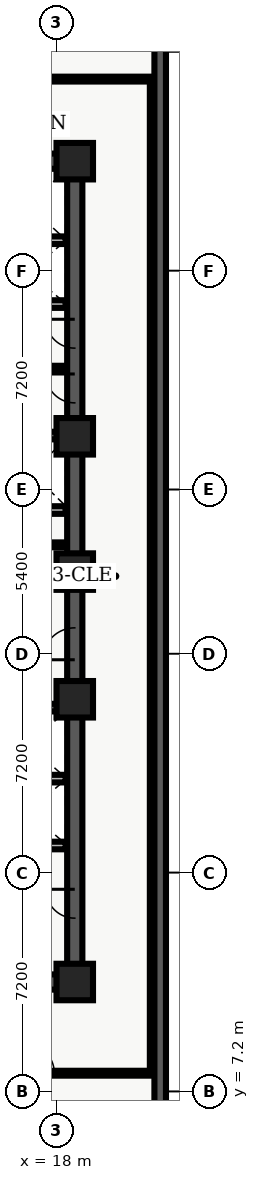
"""IFC4 building model, lengths in metres.
Left out: names, types, materials, properties, quantities, classifications, styles, units other than length and angle.
Written with IfcOpenShell. Run it as: python <this file> out.ifc"""

import sys

from ifc_helpers import new_model, entity, si_unit, converted_unit, direction, frame, origin_with_axes, origin_2d_with_axis, place, context, subcontext, project, spatial, polyline, rectangle, outline, extrude, element, fill, save


model = new_model("IFC4")
c1 = context("Model", 3, precision=1e-05, world=origin_with_axes(), true_north=direction((0.0, 1.0)))
c2 = subcontext(c1, "Body", "Model", "MODEL_VIEW")
j1 = project(units=[si_unit("LENGTHUNIT", "METRE"), converted_unit("PLANEANGLEUNIT", "DEGREE", entity("IfcPlaneAngleMeasure", 0.017), si_unit("PLANEANGLEUNIT", "RADIAN"), dimensions=[0, 0, 0, 0, 0, 0, 0])], contexts=[c1])
p1 = place(None, origin_with_axes())
s1 = spatial("IfcSite", under=j1, at=p1, CompositionType="ELEMENT")
p2 = place(p1, origin_with_axes())
s2 = spatial("IfcBuilding", under=s1, at=p2, CompositionType="ELEMENT")
p3 = place(p2, frame((0.0, 0.0, 96.9), z_axis=(0.0, 0.0, 1.0), x_axis=(1.0, 0.0, 0.0)))
s3 = spatial("IfcBuildingStorey", under=s2, at=p3, CompositionType="ELEMENT", Elevation=96.9)
p4 = place(p3, frame((11.4, 10.8, 0.0), z_axis=(0.0, 0.0, 1.0), x_axis=(1.0, 0.0, 0.0)))
e1 = element("IfcWall", 1, at=p4, inside=s3, PredefinedType="SHEAR", context=c2, shape_type="SweptSolid", body=[
    extrude(outline(polyline([(0.0, -0.25), (7.2, -0.25), (7.2, 0.25), (0.0, 0.25), (0.0, -0.25)])), origin_with_axes(), (0.0, 0.0, 1.0), 3.66),
])
p5 = place(p4, frame((2.625, 0.0, 0.0), z_axis=(0.0, 0.0, 1.0), x_axis=(1.0, 0.0, 0.0)))
e2 = element("IfcOpeningElement", 2, at=p5, cuts=e1, PredefinedType="OPENING", context=c2, shape_type="SweptSolid", body=[
    extrude(rectangle(XDim=1.05, YDim=0.52, at=origin_2d_with_axis()), origin_with_axes(), (0.0, 0.0, 1.0), 2.15),
])
p6 = place(p3, frame((11.4, 37.8, 0.0), z_axis=(0.0, 0.0, 1.0), x_axis=(1.0, 0.0, 0.0)))
e3 = element("IfcWall", 3, at=p6, inside=s3, PredefinedType="SHEAR", context=c2, shape_type="SweptSolid", body=[
    extrude(outline(polyline([(0.0, -0.25), (7.2, -0.25), (7.2, 0.25), (0.0, 0.25), (0.0, -0.25)])), origin_with_axes(), (0.0, 0.0, 1.0), 3.66),
])
p7 = place(p6, frame((2.625, 0.0, 0.0), z_axis=(0.0, 0.0, 1.0), x_axis=(1.0, 0.0, 0.0)))
e4 = element("IfcOpeningElement", 4, at=p7, cuts=e3, PredefinedType="OPENING", context=c2, shape_type="SweptSolid", body=[
    extrude(rectangle(XDim=1.05, YDim=0.52, at=origin_2d_with_axis()), origin_with_axes(), (0.0, 0.0, 1.0), 2.15),
])
p8 = place(p3, frame((18.6, 10.8, 0.0), z_axis=(0.0, 0.0, 1.0), x_axis=(0.0, 1.0, 0.0)))
e5 = element("IfcWall", 5, at=p8, inside=s3, PredefinedType="SHEAR", context=c2, shape_type="SweptSolid", body=[
    extrude(outline(polyline([(0.0, -0.25), (13.5, -0.25), (13.5, 0.25), (0.0, 0.25), (0.0, -0.25)])), origin_with_axes(), (0.0, 0.0, 1.0), 3.66),
])
p9 = place(p8, frame((11.125, 0.0, 0.0), z_axis=(0.0, 0.0, 1.0), x_axis=(1.0, 0.0, 0.0)))
e6 = element("IfcOpeningElement", 6, at=p9, cuts=e5, PredefinedType="OPENING", context=c2, shape_type="SweptSolid", body=[
    extrude(rectangle(XDim=1.05, YDim=0.52, at=origin_2d_with_axis()), origin_with_axes(), (0.0, 0.0, 1.0), 2.15),
])
p10 = place(p8, frame((2.575, 0.0, 0.0), z_axis=(0.0, 0.0, 1.0), x_axis=(1.0, 0.0, 0.0)))
e7 = element("IfcOpeningElement", 7, at=p10, cuts=e5, PredefinedType="OPENING", context=c2, shape_type="SweptSolid", body=[
    extrude(rectangle(XDim=0.95, YDim=0.52, at=origin_2d_with_axis()), origin_with_axes(), (0.0, 0.0, 1.0), 2.15),
])
p11 = place(p3, frame((18.6, 24.3, 0.0), z_axis=(0.0, 0.0, 1.0), x_axis=(0.0, 1.0, 0.0)))
e8 = element("IfcWall", 8, at=p11, inside=s3, PredefinedType="SHEAR", context=c2, shape_type="SweptSolid", body=[
    extrude(outline(polyline([(0.0, -0.25), (13.5, -0.25), (13.5, 0.25), (0.0, 0.25), (0.0, -0.25)])), origin_with_axes(), (0.0, 0.0, 1.0), 3.66),
])
p12 = place(p11, frame((6.025, 0.0, 0.0), z_axis=(0.0, 0.0, 1.0), x_axis=(1.0, 0.0, 0.0)))
e9 = element("IfcOpeningElement", 9, at=p12, cuts=e8, PredefinedType="OPENING", context=c2, shape_type="SweptSolid", body=[
    extrude(rectangle(XDim=0.95, YDim=0.52, at=origin_2d_with_axis()), origin_with_axes(), (0.0, 0.0, 1.0), 2.15),
])
p13 = place(p11, frame((7.825, 0.0, 0.0), z_axis=(0.0, 0.0, 1.0), x_axis=(1.0, 0.0, 0.0)))
e10 = element("IfcOpeningElement", 10, at=p13, cuts=e8, PredefinedType="OPENING", context=c2, shape_type="SweptSolid", body=[
    extrude(rectangle(XDim=0.95, YDim=0.52, at=origin_2d_with_axis()), origin_with_axes(), (0.0, 0.0, 1.0), 2.15),
])
for number, where, z_axis, x_axis in (
    (11, (11.65, 19.825, 0.0), (0.0, 0.0, 1.0), (1.0, 0.0, 0.0)),
    (12, (11.65, 28.775, 0.0), (0.0, 0.0, 1.0), (1.0, 0.0, 0.0)),
):
    element("IfcWall", number, at=place(p3, frame(where, z_axis=z_axis, x_axis=x_axis)), inside=s3, PredefinedType="SHEAR", context=c2, shape_type="SweptSolid", body=[
        extrude(outline(polyline([(0.0, -0.125), (6.7, -0.125), (6.7, 0.125), (0.0, 0.125), (0.0, -0.125)])), origin_with_axes(), (0.0, 0.0, 1.0), 3.66),
    ])
p14 = place(p3, frame((11.7, 24.1, 0.0), z_axis=(0.0, 0.0, 1.0), x_axis=(1.0, 0.0, 0.0)))
e13 = element("IfcWall", 13, at=p14, inside=s3, PredefinedType="SOLIDWALL", context=c2, shape_type="SweptSolid", body=[
    extrude(outline(polyline([(0.0, -0.125), (6.6, -0.125), (6.6, 0.125), (0.0, 0.125), (0.0, -0.125)])), origin_with_axes(), (0.0, 0.0, 1.0), 2.7),
])
p15 = place(p14, frame((3.75, 0.0, 0.0), z_axis=(0.0, 0.0, 1.0), x_axis=(1.0, 0.0, 0.0)))
e14 = element("IfcOpeningElement", 14, at=p15, cuts=e13, PredefinedType="OPENING", context=c2, shape_type="SweptSolid", body=[
    extrude(rectangle(XDim=0.9, YDim=0.27, at=origin_2d_with_axis()), origin_with_axes(), (0.0, 0.0, 1.0), 2.15),
])
p16 = place(p3, frame((11.7, 26.325, 0.0), z_axis=(0.0, 0.0, 1.0), x_axis=(1.0, 0.0, 0.0)))
e15 = element("IfcWall", 15, at=p16, inside=s3, PredefinedType="SOLIDWALL", context=c2, shape_type="SweptSolid", body=[
    extrude(outline(polyline([(0.0, -0.125), (6.6, -0.125), (6.6, 0.125), (0.0, 0.125), (0.0, -0.125)])), origin_with_axes(), (0.0, 0.0, 1.0), 2.7),
])
p17 = place(p16, frame((3.5, 0.0, 0.0), z_axis=(0.0, 0.0, 1.0), x_axis=(1.0, 0.0, 0.0)))
e16 = element("IfcOpeningElement", 16, at=p17, cuts=e15, PredefinedType="OPENING", context=c2, shape_type="SweptSolid", body=[
    extrude(rectangle(XDim=0.9, YDim=0.27, at=origin_2d_with_axis()), origin_with_axes(), (0.0, 0.0, 1.0), 2.15),
])
for number, where, z_axis, x_axis in (
    (17, (18.6, 10.8, 0.0), (0.0, 0.0, 1.0), (1.0, 0.0, 0.0)),
    (18, (18.6, 20.1, 0.0), (0.0, 0.0, 1.0), (1.0, 0.0, 0.0)),
    (19, (18.6, 24.3, 0.0), (0.0, 0.0, 1.0), (1.0, 0.0, 0.0)),
    (20, (18.6, 28.75, 0.0), (0.0, 0.0, 1.0), (1.0, 0.0, 0.0)),
    (21, (18.6, 37.8, 0.0), (0.0, 0.0, 1.0), (1.0, 0.0, 0.0)),
):
    element("IfcColumn", number, at=place(p3, frame(where, z_axis=z_axis, x_axis=x_axis)), inside=s3, PredefinedType="COLUMN", context=c2, shape_type="SweptSolid", body=[
        extrude(rectangle(XDim=1.2, YDim=1.2, at=origin_2d_with_axis()), origin_with_axes(), (0.0, 0.0, 1.0), 3.9),
    ])
p18 = place(p3, frame((14.62, 25.18, 0.0), z_axis=(0.0, 0.0, 1.0), x_axis=(1.0, 0.0, 0.0)))
e22 = element("IfcWall", 22, at=p18, inside=s3, PredefinedType="PARTITIONING", context=c2, shape_type="SweptSolid", body=[
    extrude(outline(polyline([(0.0, -0.08), (3.68, -0.08), (3.68, 0.08), (0.0, 0.08), (0.0, -0.08)])), origin_with_axes(), (0.0, 0.0, 1.0), 2.7),
])
p19 = place(p18, frame((1.95, 0.0, 0.0), z_axis=(0.0, 0.0, 1.0), x_axis=(1.0, 0.0, 0.0)))
e23 = element("IfcOpeningElement", 23, at=p19, cuts=e22, PredefinedType="OPENING", context=c2, shape_type="SweptSolid", body=[
    extrude(rectangle(XDim=0.9, YDim=0.18, at=origin_2d_with_axis()), origin_with_axes(), (0.0, 0.0, 1.0), 2.15),
])
for number, where, z_axis, x_axis in (
    (24, (15.84, 15.29, 0.0), (0.0, 0.0, 1.0), (1.0, 0.0, 0.0)),
    (25, (15.84, 17.49, 0.0), (0.0, 0.0, 1.0), (1.0, 0.0, 0.0)),
    (26, (15.84, 33.1, 0.0), (0.0, 0.0, 1.0), (1.0, 0.0, 0.0)),
    (27, (15.84, 35.2, 0.0), (0.0, 0.0, 1.0), (1.0, 0.0, 0.0)),
):
    element("IfcWall", number, at=place(p3, frame(where, z_axis=z_axis, x_axis=x_axis)), inside=s3, PredefinedType="SOLIDWALL", context=c2, shape_type="SweptSolid", body=[
        extrude(outline(polyline([(0.0, -0.125), (2.46, -0.125), (2.46, 0.125), (0.0, 0.125), (0.0, -0.125)])), origin_with_axes(), (0.0, 0.0, 1.0), 2.7),
    ])
p20 = place(p3, frame((15.84, 31.0, 0.0), z_axis=(0.0, 0.0, 1.0), x_axis=(1.0, 0.0, 0.0)))
e28 = element("IfcWall", 28, at=p20, inside=s3, PredefinedType="PARTITIONING", context=c2, shape_type="SweptSolid", body=[
    extrude(outline(polyline([(0.0, -0.07), (2.46, -0.07), (2.46, 0.07), (0.0, 0.07), (0.0, -0.07)])), origin_with_axes(), (0.0, 0.0, 1.0), 2.7),
])
p21 = place(p3, frame((2.6, 7.8, 0.0), z_axis=(0.0, 0.0, 1.0), x_axis=(1.0, 0.0, 0.0)))
e29 = element("IfcWall", 29, at=p21, inside=s3, PredefinedType="PARTITIONING", context=c2, shape_type="SweptSolid", body=[
    extrude(outline(polyline([(0.0, -0.08), (18.625, -0.08), (18.625, 0.08), (0.0, 0.08), (0.0, -0.08)])), origin_with_axes(), (0.0, 0.0, 1.0), 2.7),
])
p22 = place(p21, frame((2.233, 0.0, 0.0), z_axis=(0.0, 0.0, 1.0), x_axis=(1.0, 0.0, 0.0)))
e30 = element("IfcOpeningElement", 30, at=p22, cuts=e29, PredefinedType="OPENING", context=c2, shape_type="SweptSolid", body=[
    extrude(rectangle(XDim=1.0, YDim=0.18, at=origin_2d_with_axis()), origin_with_axes(), (0.0, 0.0, 1.0), 2.15),
])
p23 = place(p21, frame((8.095, 0.0, 0.0), z_axis=(0.0, 0.0, 1.0), x_axis=(1.0, 0.0, 0.0)))
e31 = element("IfcOpeningElement", 31, at=p23, cuts=e29, PredefinedType="OPENING", context=c2, shape_type="SweptSolid", body=[
    extrude(rectangle(XDim=1.0, YDim=0.18, at=origin_2d_with_axis()), origin_with_axes(), (0.0, 0.0, 1.0), 2.15),
])
p24 = place(p21, frame((14.827, 0.0, 0.0), z_axis=(0.0, 0.0, 1.0), x_axis=(1.0, 0.0, 0.0)))
e32 = element("IfcOpeningElement", 32, at=p24, cuts=e29, PredefinedType="OPENING", context=c2, shape_type="SweptSolid", body=[
    extrude(rectangle(XDim=1.0, YDim=0.18, at=origin_2d_with_axis()), origin_with_axes(), (0.0, 0.0, 1.0), 2.15),
])
p25 = place(p3, frame((2.6, 40.5, 0.0), z_axis=(0.0, 0.0, 1.0), x_axis=(1.0, 0.0, 0.0)))
e33 = element("IfcWall", 33, at=p25, inside=s3, PredefinedType="PARTITIONING", context=c2, shape_type="SweptSolid", body=[
    extrude(outline(polyline([(0.0, -0.08), (18.65, -0.08), (18.65, 0.08), (0.0, 0.08), (0.0, -0.08)])), origin_with_axes(), (0.0, 0.0, 1.0), 2.7),
])
p26 = place(p25, frame((5.275, 0.0, 0.0), z_axis=(0.0, 0.0, 1.0), x_axis=(1.0, 0.0, 0.0)))
e34 = element("IfcOpeningElement", 34, at=p26, cuts=e33, PredefinedType="OPENING", context=c2, shape_type="SweptSolid", body=[
    extrude(rectangle(XDim=1.0, YDim=0.18, at=origin_2d_with_axis()), origin_with_axes(), (0.0, 0.0, 1.0), 2.15),
])
p27 = place(p25, frame((12.61, 0.0, 0.0), z_axis=(0.0, 0.0, 1.0), x_axis=(1.0, 0.0, 0.0)))
e35 = element("IfcOpeningElement", 35, at=p27, cuts=e33, PredefinedType="OPENING", context=c2, shape_type="SweptSolid", body=[
    extrude(rectangle(XDim=1.2, YDim=0.18, at=origin_2d_with_axis()), origin_with_axes(), (0.0, 0.0, 1.0), 2.2),
])
p28 = place(p3, frame((21.15, 7.8, 0.0), z_axis=(0.0, 0.0, 1.0), x_axis=(0.0, 1.0, 0.0)))
e36 = element("IfcWall", 36, at=p28, inside=s3, PredefinedType="PARTITIONING", context=c2, shape_type="SweptSolid", body=[
    extrude(outline(polyline([(0.0, -0.08), (32.7, -0.08), (32.7, 0.08), (0.0, 0.08), (0.0, -0.08)])), origin_with_axes(), (0.0, 0.0, 1.0), 2.7),
])
p29 = place(p3, frame((21.41, 45.82, 0.0), z_axis=(0.0, 0.0, 1.0), x_axis=(0.0, -1.0, 0.0)))
e37 = element("IfcWall", 37, at=p29, inside=s3, PredefinedType="SOLIDWALL", context=c2, shape_type="SweptSolid", body=[
    extrude(outline(polyline([(0.0, -0.19), (45.82, -0.19), (45.82, 0.19), (0.0, 0.19), (0.0, -0.19)])), origin_with_axes(), (0.0, 0.0, 1.0), 3.66),
])
p30 = place(p29, frame((3.079, 0.0, 0.45), z_axis=(0.0, 0.0, 1.0), x_axis=(1.0, 0.0, 0.0)))
e38 = element("IfcOpeningElement", 38, at=p30, cuts=e37, PredefinedType="OPENING", context=c2, shape_type="SweptSolid", body=[
    extrude(rectangle(XDim=2.1, YDim=0.4, at=origin_2d_with_axis()), origin_with_axes(), (0.0, 0.0, 1.0), 2.2),
])
p31 = place(p29, frame((42.741, 0.0, 0.45), z_axis=(0.0, 0.0, 1.0), x_axis=(1.0, 0.0, 0.0)))
e39 = element("IfcOpeningElement", 39, at=p31, cuts=e37, PredefinedType="OPENING", context=c2, shape_type="SweptSolid", body=[
    extrude(rectangle(XDim=2.1, YDim=0.4, at=origin_2d_with_axis()), origin_with_axes(), (0.0, 0.0, 1.0), 2.2),
])
p32 = place(p8, frame((11.125, 0.0, 0.0), z_axis=(0.0, 0.0, 1.0), x_axis=(1.0, 0.0, 0.0)))
e40 = element("IfcDoor", 40, at=p32, inside=s3, OperationType="SINGLE_SWING_LEFT", PredefinedType="DOOR", context=c2, shape_type="SweptSolid", body=[
    extrude(rectangle(XDim=1.05, YDim=0.09, at=origin_2d_with_axis()), origin_with_axes(), (0.0, 0.0, 1.0), 2.15),
])
fill(e6, e40)
p33 = place(p8, frame((2.575, 0.0, 0.0), z_axis=(0.0, 0.0, 1.0), x_axis=(1.0, 0.0, 0.0)))
e41 = element("IfcDoor", 41, at=p33, inside=s3, OperationType="SINGLE_SWING_RIGHT", PredefinedType="DOOR", context=c2, shape_type="SweptSolid", body=[
    extrude(rectangle(XDim=0.95, YDim=0.09, at=origin_2d_with_axis()), origin_with_axes(), (0.0, 0.0, 1.0), 2.15),
])
fill(e7, e41)
p34 = place(p11, frame((6.025, 0.0, 0.0), z_axis=(0.0, 0.0, 1.0), x_axis=(1.0, 0.0, 0.0)))
e42 = element("IfcDoor", 42, at=p34, inside=s3, OperationType="SINGLE_SWING_RIGHT", PredefinedType="DOOR", context=c2, shape_type="SweptSolid", body=[
    extrude(rectangle(XDim=0.95, YDim=0.09, at=origin_2d_with_axis()), origin_with_axes(), (0.0, 0.0, 1.0), 2.15),
])
fill(e9, e42)
p35 = place(p11, frame((7.825, 0.0, 0.0), z_axis=(0.0, 0.0, 1.0), x_axis=(1.0, 0.0, 0.0)))
e43 = element("IfcDoor", 43, at=p35, inside=s3, OperationType="SINGLE_SWING_RIGHT", PredefinedType="DOOR", context=c2, shape_type="SweptSolid", body=[
    extrude(rectangle(XDim=0.95, YDim=0.09, at=origin_2d_with_axis()), origin_with_axes(), (0.0, 0.0, 1.0), 2.15),
])
fill(e10, e43)
p36 = place(p21, frame((14.827, 0.0, 0.0), z_axis=(0.0, 0.0, 1.0), x_axis=(1.0, 0.0, 0.0)))
e44 = element("IfcDoor", 44, at=p36, inside=s3, OperationType="SINGLE_SWING_LEFT", PredefinedType="DOOR", context=c2, shape_type="SweptSolid", body=[
    extrude(rectangle(XDim=1.0, YDim=0.09, at=origin_2d_with_axis()), origin_with_axes(), (0.0, 0.0, 1.0), 2.15),
])
fill(e32, e44)
save(model, sys.argv[1])
